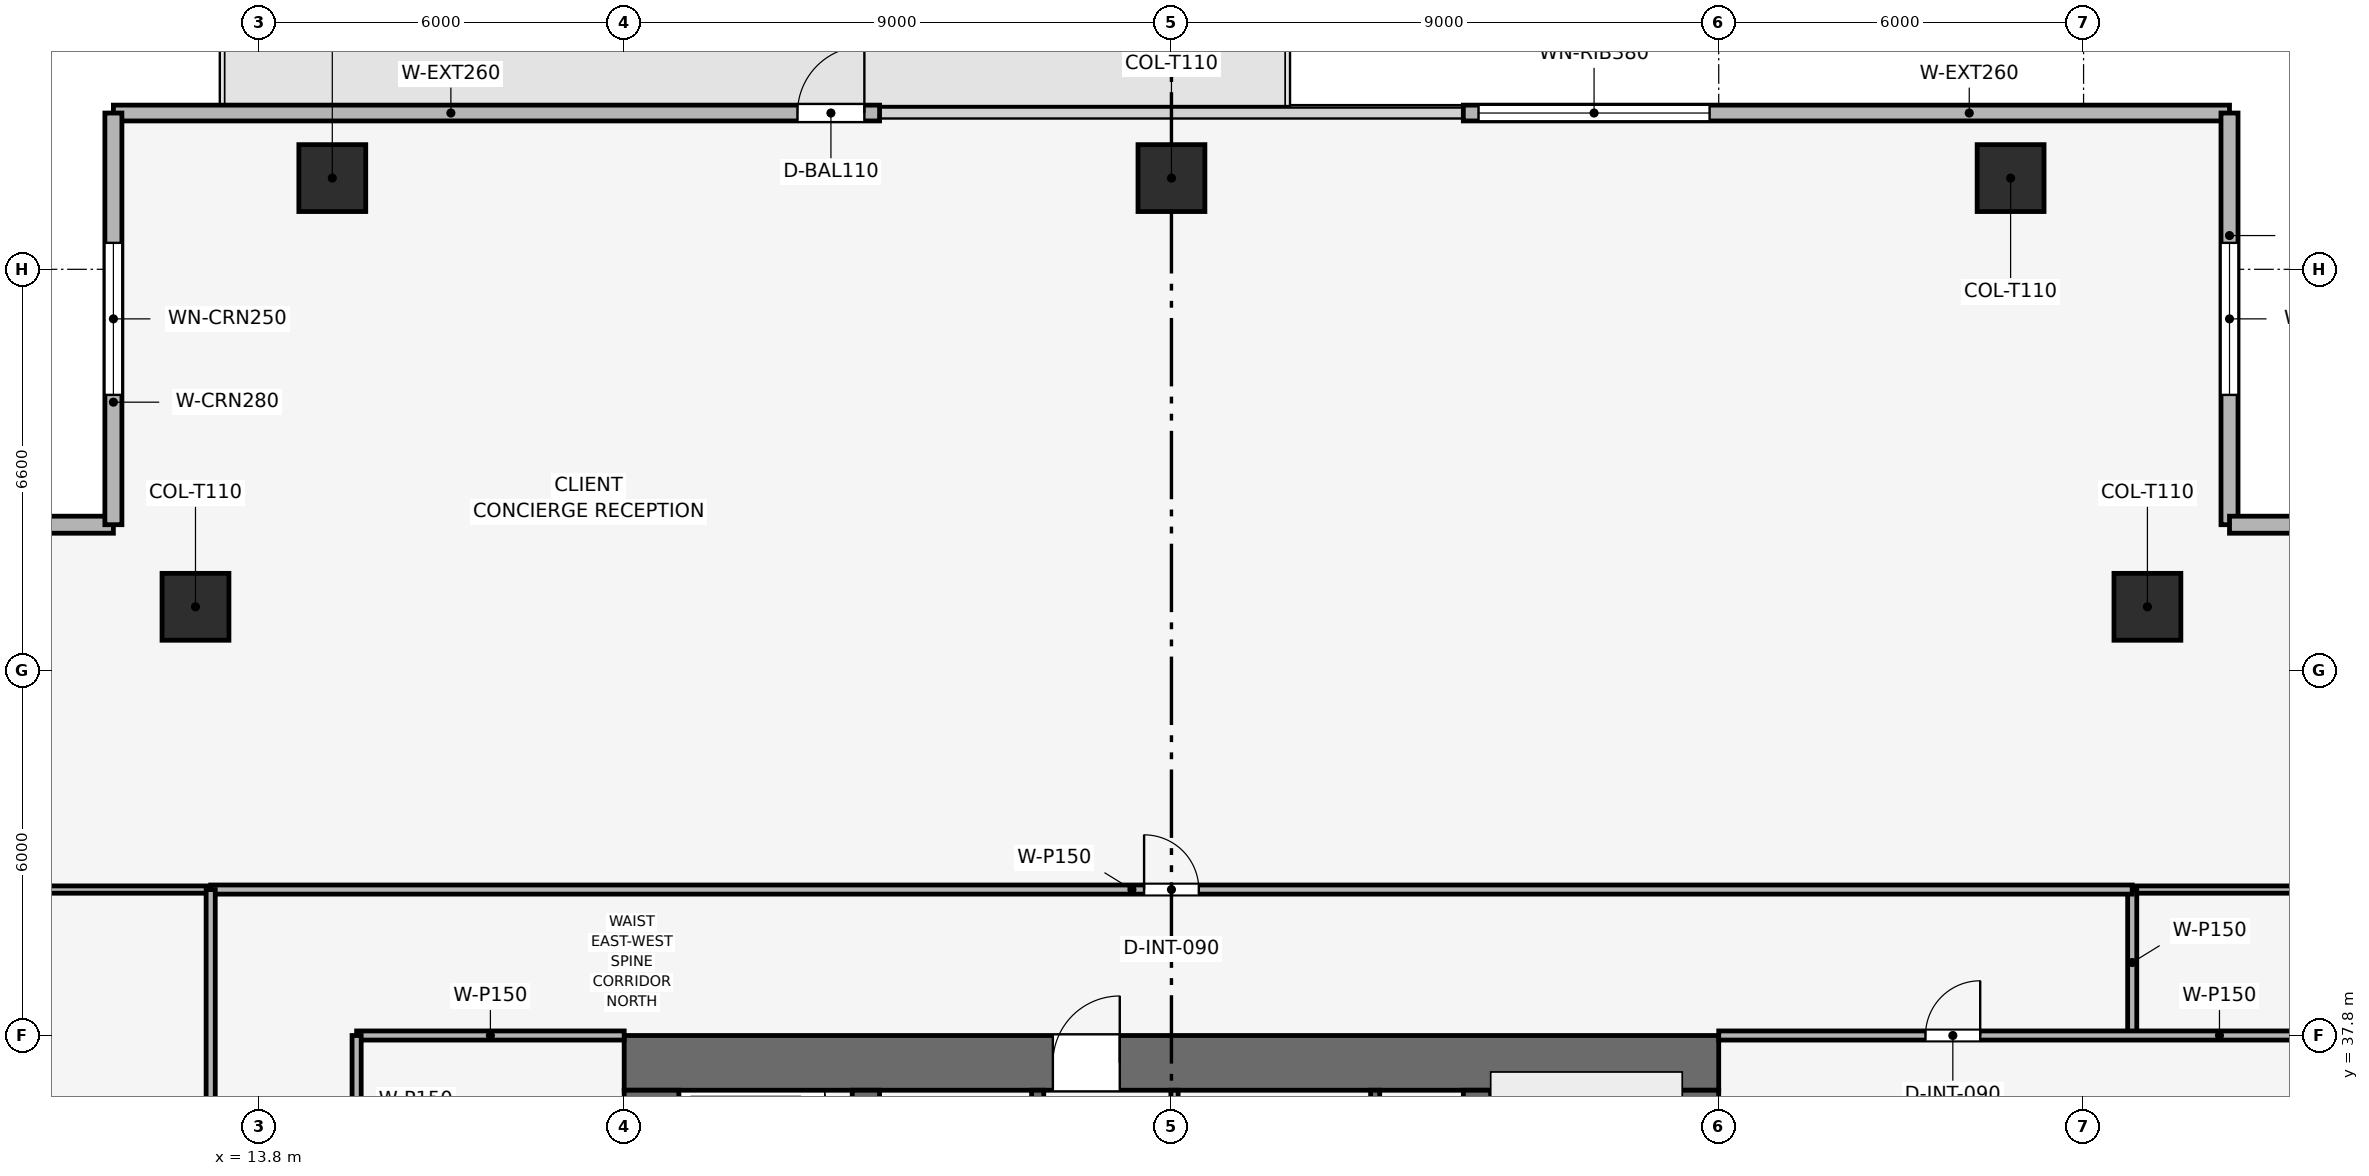
"""IFC4 building model, lengths in metres.
Left out: names, types, materials, properties, quantities, classifications, styles, units other than length and angle.
Written with IfcOpenShell. Run it as: python <this file> out.ifc"""

import sys

from ifc_helpers import new_model, si_unit, direction, frame, frame_2d, origin, origin_2d, place, context, subcontext, project, spatial, rectangle, extrude, element, fill, save


model = new_model("IFC4")
c1 = context("Model", 3, precision=1e-05, world=origin(), true_north=direction((0.0, 1.0)))
c2 = subcontext(c1, "Body", "Model", "MODEL_VIEW")
j1 = project(units=[si_unit("LENGTHUNIT", "METRE"), si_unit("PLANEANGLEUNIT", "RADIAN")], contexts=[c1])
p1 = place(None, origin())
s1 = spatial("IfcSite", under=j1, at=p1, CompositionType="ELEMENT")
p2 = place(p1, origin())
s2 = spatial("IfcBuilding", under=s1, at=p2, CompositionType="ELEMENT")
p3 = place(p2, frame((0.0, 0.0, 142.05)))
s3 = spatial("IfcBuildingStorey", under=s2, at=p3, CompositionType="ELEMENT", Elevation=142.05)
p4 = place(p3, frame((19.8, 37.35, 0.0), z_axis=(0.0, 0.0, 1.0), x_axis=(1.0, 0.0, 0.0)))
e1 = element("IfcWall", 1, at=p4, inside=s3, PredefinedType="SHEAR", context=c2, shape_type="SweptSolid", body=[
    extrude(rectangle(XDim=18.0, YDim=0.9, at=frame_2d((9.0, 0.0))), origin(), (0.0, 0.0, 1.0), 3.75),
])
p5 = place(p4, frame((7.05, 0.0, 0.0)))
e2 = element("IfcOpeningElement", 2, at=p5, cuts=e1, PredefinedType="OPENING", context=c2, shape_type="SweptSolid", body=[
    extrude(rectangle(XDim=1.1, YDim=2.15, at=frame_2d((0.55, 1.075))), frame((0.0, 0.46, 0.0), z_axis=(0.0, -1.0, 0.0), x_axis=(1.0, 0.0, 0.0)), (0.0, 0.0, 1.0), 0.92),
])
p6 = place(p3, frame((20.25, 20.7, 0.0), z_axis=(0.0, 0.0, 1.0), x_axis=(0.0, 1.0, 0.0)))
e3 = element("IfcWall", 3, at=p6, inside=s3, PredefinedType="SHEAR", context=c2, shape_type="SweptSolid", body=[
    extrude(rectangle(XDim=16.2, YDim=0.9, at=frame_2d((8.1, 0.0))), origin(), (0.0, 0.0, 1.0), 3.75),
])
p7 = place(p6, frame((10.1, 0.0, 0.0)))
e4 = element("IfcOpeningElement", 4, at=p7, cuts=e3, PredefinedType="OPENING", context=c2, shape_type="SweptSolid", body=[
    extrude(rectangle(XDim=1.1, YDim=2.15, at=frame_2d((0.55, 1.075))), frame((0.0, 0.46, 0.0), z_axis=(0.0, -1.0, 0.0), x_axis=(1.0, 0.0, 0.0)), (0.0, 0.0, 1.0), 0.92),
])
p8 = place(p3, frame((37.35, 20.7, 0.0), z_axis=(0.0, 0.0, 1.0), x_axis=(0.0, 1.0, 0.0)))
e5 = element("IfcWall", 5, at=p8, inside=s3, PredefinedType="SHEAR", context=c2, shape_type="SweptSolid", body=[
    extrude(rectangle(XDim=16.2, YDim=0.9, at=frame_2d((8.1, 0.0))), origin(), (0.0, 0.0, 1.0), 3.75),
])
p9 = place(p8, frame((4.6, 0.0, 0.0)))
e6 = element("IfcOpeningElement", 6, at=p9, cuts=e5, PredefinedType="OPENING", context=c2, shape_type="SweptSolid", body=[
    extrude(rectangle(XDim=1.1, YDim=2.15, at=frame_2d((0.55, 1.075))), frame((0.0, 0.46, 0.0), z_axis=(0.0, -1.0, 0.0), x_axis=(1.0, 0.0, 0.0)), (0.0, 0.0, 1.0), 0.92),
])
for number, where, z_axis, x_axis in (
    (7, (23.775, 20.7, 0.0), (0.0, 0.0, 1.0), (0.0, 1.0, 0.0)),
    (8, (33.825, 20.7, 0.0), (0.0, 0.0, 1.0), (0.0, 1.0, 0.0)),
):
    element("IfcWall", number, at=place(p3, frame(where, z_axis=z_axis, x_axis=x_axis)), inside=s3, PredefinedType="SHEAR", context=c2, shape_type="SweptSolid", body=[
        extrude(rectangle(XDim=16.2, YDim=0.45, at=frame_2d((8.1, 0.0))), origin(), (0.0, 0.0, 1.0), 3.75),
    ])
for number, where, z_axis, x_axis in (
    (9, (42.6, 51.9, 0.003), (0.0, 0.0, 1.0), (1.0, 0.0, 0.0)),
    (10, (28.8, 51.9, 0.003), (0.0, 0.0, 1.0), (1.0, 0.0, 0.0)),
    (11, (15.0, 51.9, 0.003), (0.0, 0.0, 1.0), (1.0, 0.0, 0.0)),
    (12, (44.85, 44.85, 0.003), (0.0, 0.0, 1.0), (1.0, 0.0, 0.0)),
    (13, (12.75, 44.85, 0.003), (0.0, 0.0, 1.0), (1.0, 0.0, 0.0)),
):
    element("IfcColumn", number, at=place(p3, frame(where, z_axis=z_axis, x_axis=x_axis)), inside=s3, PredefinedType="COLUMN", context=c2, shape_type="SweptSolid", body=[
        extrude(rectangle(XDim=1.1, YDim=1.1, at=origin_2d()), origin(), (0.0, 0.0, 1.0), 3.489),
    ])
p10 = place(p3, frame((11.4, 52.97, 0.0), z_axis=(0.0, 0.0, 1.0), x_axis=(1.0, 0.0, 0.0)))
e14 = element("IfcWall", 14, at=p10, inside=s3, PredefinedType="SOLIDWALL", context=c2, shape_type="SweptSolid", body=[
    extrude(rectangle(XDim=12.6, YDim=0.26, at=frame_2d((6.3, 0.0))), origin(), (0.0, 0.0, 1.0), 3.495),
])
p11 = place(p10, frame((11.25, 0.0, 0.0)))
e15 = element("IfcOpeningElement", 15, at=p11, cuts=e14, PredefinedType="OPENING", context=c2, shape_type="SweptSolid", body=[
    extrude(rectangle(XDim=1.1, YDim=2.2, at=frame_2d((0.55, 1.1))), frame((0.0, 0.14, 0.0), z_axis=(0.0, -1.0, 0.0), x_axis=(1.0, 0.0, 0.0)), (0.0, 0.0, 1.0), 0.28),
])
p12 = place(p3, frame((33.6, 52.97, 0.0), z_axis=(0.0, 0.0, 1.0), x_axis=(1.0, 0.0, 0.0)))
e16 = element("IfcWall", 16, at=p12, inside=s3, PredefinedType="SOLIDWALL", context=c2, shape_type="SweptSolid", body=[
    extrude(rectangle(XDim=12.6, YDim=0.26, at=frame_2d((6.3, 0.0))), origin(), (0.0, 0.0, 1.0), 3.495),
])
p13 = place(p12, frame((0.25, 0.0, 0.9)))
e17 = element("IfcOpeningElement", 17, at=p13, cuts=e16, PredefinedType="OPENING", context=c2, shape_type="SweptSolid", body=[
    extrude(rectangle(XDim=3.8, YDim=1.9, at=frame_2d((1.9, 0.95))), frame((0.0, 0.14, 0.0), z_axis=(0.0, -1.0, 0.0), x_axis=(1.0, 0.0, 0.0)), (0.0, 0.0, 1.0), 0.28),
])
p14 = place(p3, frame((4.63, 46.2, 0.0), z_axis=(0.0, 0.0, 1.0), x_axis=(1.0, 0.0, 0.0)))
e18 = element("IfcWall", 18, at=p14, inside=s3, PredefinedType="SOLIDWALL", context=c2, shape_type="SweptSolid", body=[
    extrude(rectangle(XDim=6.77, YDim=0.28, at=frame_2d((3.385, 0.0))), origin(), (0.0, 0.0, 1.0), 3.495),
])
p15 = place(p14, frame((2.135, 0.0, 0.9)))
e19 = element("IfcOpeningElement", 19, at=p15, cuts=e18, PredefinedType="OPENING", context=c2, shape_type="SweptSolid", body=[
    extrude(rectangle(XDim=2.5, YDim=1.9, at=frame_2d((1.25, 0.95))), frame((0.0, 0.15, 0.0), z_axis=(0.0, -1.0, 0.0), x_axis=(1.0, 0.0, 0.0)), (0.0, 0.0, 1.0), 0.3),
])
p16 = place(p3, frame((11.4, 46.2, 0.0), z_axis=(0.0, 0.0, 1.0), x_axis=(0.0, 1.0, 0.0)))
e20 = element("IfcWall", 20, at=p16, inside=s3, PredefinedType="SOLIDWALL", context=c2, shape_type="SweptSolid", body=[
    extrude(rectangle(XDim=6.77, YDim=0.28, at=frame_2d((3.385, 0.0))), origin(), (0.0, 0.0, 1.0), 3.495),
])
p17 = place(p16, frame((2.135, 0.0, 0.9)))
e21 = element("IfcOpeningElement", 21, at=p17, cuts=e20, PredefinedType="OPENING", context=c2, shape_type="SweptSolid", body=[
    extrude(rectangle(XDim=2.5, YDim=1.9, at=frame_2d((1.25, 0.95))), frame((0.0, 0.15, 0.0), z_axis=(0.0, -1.0, 0.0), x_axis=(1.0, 0.0, 0.0)), (0.0, 0.0, 1.0), 0.3),
])
p18 = place(p3, frame((46.2, 52.97, 0.0), z_axis=(0.0, 0.0, 1.0), x_axis=(0.0, -1.0, 0.0)))
e22 = element("IfcWall", 22, at=p18, inside=s3, PredefinedType="SOLIDWALL", context=c2, shape_type="SweptSolid", body=[
    extrude(rectangle(XDim=6.77, YDim=0.28, at=frame_2d((3.385, 0.0))), origin(), (0.0, 0.0, 1.0), 3.495),
])
p19 = place(p18, frame((2.135, 0.0, 0.9)))
e23 = element("IfcOpeningElement", 23, at=p19, cuts=e22, PredefinedType="OPENING", context=c2, shape_type="SweptSolid", body=[
    extrude(rectangle(XDim=2.5, YDim=1.9, at=frame_2d((1.25, 0.95))), frame((0.0, 0.15, 0.0), z_axis=(0.0, -1.0, 0.0), x_axis=(1.0, 0.0, 0.0)), (0.0, 0.0, 1.0), 0.3),
])
p20 = place(p3, frame((46.2, 46.2, 0.0), z_axis=(0.0, 0.0, 1.0), x_axis=(1.0, 0.0, 0.0)))
e24 = element("IfcWall", 24, at=p20, inside=s3, PredefinedType="SOLIDWALL", context=c2, shape_type="SweptSolid", body=[
    extrude(rectangle(XDim=6.77, YDim=0.28, at=frame_2d((3.385, 0.0))), origin(), (0.0, 0.0, 1.0), 3.495),
])
p21 = place(p20, frame((2.135, 0.0, 0.9)))
e25 = element("IfcOpeningElement", 25, at=p21, cuts=e24, PredefinedType="OPENING", context=c2, shape_type="SweptSolid", body=[
    extrude(rectangle(XDim=2.5, YDim=1.9, at=frame_2d((1.25, 0.95))), frame((0.0, 0.15, 0.0), z_axis=(0.0, -1.0, 0.0), x_axis=(1.0, 0.0, 0.0)), (0.0, 0.0, 1.0), 0.3),
])
p22 = place(p3, frame((32.15, 34.0, 0.0), z_axis=(0.0, 0.0, 1.0), x_axis=(0.0, 1.0, 0.0)))
e26 = element("IfcWall", 26, at=p22, inside=s3, PredefinedType="SHEAR", context=c2, shape_type="SweptSolid", body=[
    extrude(rectangle(XDim=2.9, YDim=0.15, at=frame_2d((1.45, 0.0))), origin(), (0.0, 0.0, 1.0), 3.495),
])
p23 = place(p3, frame((26.6, 34.0, 0.0), z_axis=(0.0, 0.0, 1.0), x_axis=(0.0, 1.0, 0.0)))
e27 = element("IfcWall", 27, at=p23, inside=s3, PredefinedType="SHEAR", context=c2, shape_type="SweptSolid", body=[
    extrude(rectangle(XDim=2.9, YDim=0.2, at=frame_2d((1.45, 0.0))), origin(), (0.0, 0.0, 1.0), 3.495),
])
p24 = place(p23, frame((0.75, 0.0, 0.0)))
e28 = element("IfcOpeningElement", 28, at=p24, cuts=e27, PredefinedType="OPENING", context=c2, shape_type="SweptSolid", body=[
    extrude(rectangle(XDim=1.1, YDim=2.15, at=frame_2d((0.55, 1.075))), frame((0.0, 0.11, 0.0), z_axis=(0.0, -1.0, 0.0), x_axis=(1.0, 0.0, 0.0)), (0.0, 0.0, 1.0), 0.22),
])
p25 = place(p3, frame((28.85, 33.925, 0.0), z_axis=(0.0, 0.0, 1.0), x_axis=(0.0, 1.0, 0.0)))
e29 = element("IfcWall", 29, at=p25, inside=s3, PredefinedType="PARTITIONING", context=c2, shape_type="SweptSolid", body=[
    extrude(rectangle(XDim=2.975, YDim=0.12, at=frame_2d((1.487, 0.0))), origin(), (0.0, 0.0, 1.0), 3.495),
])
p26 = place(p25, frame((0.25, 0.0, 0.0)))
e30 = element("IfcOpeningElement", 30, at=p26, cuts=e29, PredefinedType="OPENING", context=c2, shape_type="SweptSolid", body=[
    extrude(rectangle(XDim=0.85, YDim=2.1, at=frame_2d((0.425, 1.05))), frame((0.0, 0.07, 0.0), z_axis=(0.0, -1.0, 0.0), x_axis=(1.0, 0.0, 0.0)), (0.0, 0.0, 1.0), 0.14),
])
p27 = place(p25, frame((1.645, 0.0, 0.0)))
e31 = element("IfcOpeningElement", 31, at=p27, cuts=e29, PredefinedType="OPENING", context=c2, shape_type="SweptSolid", body=[
    extrude(rectangle(XDim=0.85, YDim=2.1, at=frame_2d((0.425, 1.05))), frame((0.0, 0.07, 0.0), z_axis=(0.0, -1.0, 0.0), x_axis=(1.0, 0.0, 0.0)), (0.0, 0.0, 1.0), 0.14),
])
p28 = place(p3, frame((15.4, 37.8, 0.0), z_axis=(0.0, 0.0, 1.0), x_axis=(1.0, 0.0, 0.0)))
e32 = element("IfcWall", 32, at=p28, inside=s3, PredefinedType="PARTITIONING", context=c2, shape_type="SweptSolid", body=[
    extrude(rectangle(XDim=4.4, YDim=0.15, at=frame_2d((2.2, 0.0))), origin(), (0.0, 0.0, 1.0), 3.03),
])
p29 = place(p3, frame((15.4, 32.45, 0.0), z_axis=(0.0, 0.0, 1.0), x_axis=(0.0, 1.0, 0.0)))
e33 = element("IfcWall", 33, at=p29, inside=s3, PredefinedType="PARTITIONING", context=c2, shape_type="SweptSolid", body=[
    extrude(rectangle(XDim=5.35, YDim=0.15, at=frame_2d((2.675, 0.0))), origin(), (0.0, 0.0, 1.0), 3.03),
])
p30 = place(p29, frame((2.1, 0.0, 0.0)))
e34 = element("IfcOpeningElement", 34, at=p30, cuts=e33, PredefinedType="OPENING", context=c2, shape_type="SweptSolid", body=[
    extrude(rectangle(XDim=0.9, YDim=2.1, at=frame_2d((0.45, 1.05))), frame((0.0, 0.085, 0.0), z_axis=(0.0, -1.0, 0.0), x_axis=(1.0, 0.0, 0.0)), (0.0, 0.0, 1.0), 0.17),
])
p31 = place(p3, frame((4.63, 40.2, 0.0), z_axis=(0.0, 0.0, 1.0), x_axis=(1.0, 0.0, 0.0)))
e35 = element("IfcWall", 35, at=p31, inside=s3, PredefinedType="PARTITIONING", context=c2, shape_type="SweptSolid", body=[
    extrude(rectangle(XDim=8.37, YDim=0.12, at=frame_2d((4.185, 0.0))), origin(), (0.0, 0.0, 1.0), 2.98),
])
p32 = place(p3, frame((44.6, 40.2, 0.0), z_axis=(0.0, 0.0, 1.0), x_axis=(1.0, 0.0, 0.0)))
e36 = element("IfcWall", 36, at=p32, inside=s3, PredefinedType="PARTITIONING", context=c2, shape_type="SweptSolid", body=[
    extrude(rectangle(XDim=8.37, YDim=0.12, at=frame_2d((4.185, 0.0))), origin(), (0.0, 0.0, 1.0), 2.98),
])
p33 = place(p3, frame((44.6, 37.8, 0.0), z_axis=(0.0, 0.0, 1.0), x_axis=(0.0, 1.0, 0.0)))
e37 = element("IfcWall", 37, at=p33, inside=s3, PredefinedType="PARTITIONING", context=c2, shape_type="SweptSolid", body=[
    extrude(rectangle(XDim=2.4, YDim=0.15, at=frame_2d((1.2, 0.0))), origin(), (0.0, 0.0, 1.0), 3.495),
])
p34 = place(p3, frame((37.8, 37.8, 0.0), z_axis=(0.0, 0.0, 1.0), x_axis=(1.0, 0.0, 0.0)))
e38 = element("IfcWall", 38, at=p34, inside=s3, PredefinedType="PARTITIONING", context=c2, shape_type="SweptSolid", body=[
    extrude(rectangle(XDim=15.17, YDim=0.15, at=frame_2d((7.585, 0.0))), origin(), (0.0, 0.0, 1.0), 2.98),
])
p35 = place(p34, frame((3.4, 0.0, 0.0)))
e39 = element("IfcOpeningElement", 39, at=p35, cuts=e38, PredefinedType="OPENING", context=c2, shape_type="SweptSolid", body=[
    extrude(rectangle(XDim=0.9, YDim=2.1, at=frame_2d((0.45, 1.05))), frame((0.0, 0.085, 0.0), z_axis=(0.0, -1.0, 0.0), x_axis=(1.0, 0.0, 0.0)), (0.0, 0.0, 1.0), 0.17),
])
p36 = place(p3, frame((13.0, 40.2, 0.0), z_axis=(0.0, 0.0, 1.0), x_axis=(1.0, 0.0, 0.0)))
e40 = element("IfcWall", 40, at=p36, inside=s3, PredefinedType="PARTITIONING", context=c2, shape_type="SweptSolid", body=[
    extrude(rectangle(XDim=31.6, YDim=0.15, at=frame_2d((15.8, 0.0))), origin(), (0.0, 0.0, 1.0), 3.03),
])
p37 = place(p36, frame((15.35, 0.0, 0.0)))
e41 = element("IfcOpeningElement", 41, at=p37, cuts=e40, PredefinedType="OPENING", context=c2, shape_type="SweptSolid", body=[
    extrude(rectangle(XDim=0.9, YDim=2.1, at=frame_2d((0.45, 1.05))), frame((0.0, 0.085, 0.0), z_axis=(0.0, -1.0, 0.0), x_axis=(1.0, 0.0, 0.0)), (0.0, 0.0, 1.0), 0.17),
])
p38 = place(p3, frame((13.0, 17.4, 0.0), z_axis=(0.0, 0.0, 1.0), x_axis=(0.0, 1.0, 0.0)))
e42 = element("IfcWall", 42, at=p38, inside=s3, PredefinedType="PARTITIONING", context=c2, shape_type="SweptSolid", body=[
    extrude(rectangle(XDim=22.8, YDim=0.15, at=frame_2d((11.4, 0.0))), origin(), (0.0, 0.0, 1.0), 3.03),
])
p39 = place(p38, frame((3.113, 0.0, 0.0)))
e43 = element("IfcOpeningElement", 43, at=p39, cuts=e42, PredefinedType="OPENING", context=c2, shape_type="SweptSolid", body=[
    extrude(rectangle(XDim=0.9, YDim=2.1, at=frame_2d((0.45, 1.05))), frame((0.0, 0.085, 0.0), z_axis=(0.0, -1.0, 0.0), x_axis=(1.0, 0.0, 0.0)), (0.0, 0.0, 1.0), 0.17),
])
p40 = place(p38, frame((7.542, 0.0, 0.0)))
e44 = element("IfcOpeningElement", 44, at=p40, cuts=e42, PredefinedType="OPENING", context=c2, shape_type="SweptSolid", body=[
    extrude(rectangle(XDim=0.9, YDim=2.1, at=frame_2d((0.45, 1.05))), frame((0.0, 0.085, 0.0), z_axis=(0.0, -1.0, 0.0), x_axis=(1.0, 0.0, 0.0)), (0.0, 0.0, 1.0), 0.17),
])
p41 = place(p38, frame((15.378, 0.0, 0.0)))
e45 = element("IfcOpeningElement", 45, at=p41, cuts=e42, PredefinedType="OPENING", context=c2, shape_type="SweptSolid", body=[
    extrude(rectangle(XDim=0.9, YDim=2.1, at=frame_2d((0.45, 1.05))), frame((0.0, 0.085, 0.0), z_axis=(0.0, -1.0, 0.0), x_axis=(1.0, 0.0, 0.0)), (0.0, 0.0, 1.0), 0.17),
])
p42 = place(p11, origin())
e46 = element("IfcDoor", 46, at=p42, inside=s3, OperationType="SINGLE_SWING_RIGHT", PredefinedType="DOOR", context=c2, shape_type="SweptSolid", body=[
    extrude(rectangle(XDim=1.1, YDim=2.2, at=frame_2d((0.55, 1.1))), frame((0.0, 0.025, 0.0), z_axis=(0.0, -1.0, 0.0), x_axis=(1.0, 0.0, 0.0)), (0.0, 0.0, 1.0), 0.05),
])
fill(e15, e46)
p43 = place(p13, origin())
e47 = element("IfcWindow", 47, at=p43, inside=s3, PartitioningType="SINGLE_PANEL", PredefinedType="WINDOW", context=c2, shape_type="SweptSolid", body=[
    extrude(rectangle(XDim=3.8, YDim=1.9, at=frame_2d((1.9, 0.95))), frame((0.0, 0.03, 0.0), z_axis=(0.0, -1.0, 0.0), x_axis=(1.0, 0.0, 0.0)), (0.0, 0.0, 1.0), 0.06),
])
fill(e17, e47)
p44 = place(p17, origin())
e48 = element("IfcWindow", 48, at=p44, inside=s3, PartitioningType="SINGLE_PANEL", PredefinedType="WINDOW", context=c2, shape_type="SweptSolid", body=[
    extrude(rectangle(XDim=2.5, YDim=1.9, at=frame_2d((1.25, 0.95))), frame((0.0, 0.03, 0.0), z_axis=(0.0, -1.0, 0.0), x_axis=(1.0, 0.0, 0.0)), (0.0, 0.0, 1.0), 0.06),
])
fill(e21, e48)
p45 = place(p19, origin())
e49 = element("IfcWindow", 49, at=p45, inside=s3, PartitioningType="SINGLE_PANEL", PredefinedType="WINDOW", context=c2, shape_type="SweptSolid", body=[
    extrude(rectangle(XDim=2.5, YDim=1.9, at=frame_2d((1.25, 0.95))), frame((0.0, 0.03, 0.0), z_axis=(0.0, -1.0, 0.0), x_axis=(1.0, 0.0, 0.0)), (0.0, 0.0, 1.0), 0.06),
])
fill(e23, e49)
p46 = place(p35, origin())
e50 = element("IfcDoor", 50, at=p46, inside=s3, OperationType="SINGLE_SWING_RIGHT", PredefinedType="DOOR", context=c2, shape_type="SweptSolid", body=[
    extrude(rectangle(XDim=0.9, YDim=2.1, at=frame_2d((0.45, 1.05))), frame((0.0, 0.025, 0.0), z_axis=(0.0, -1.0, 0.0), x_axis=(1.0, 0.0, 0.0)), (0.0, 0.0, 1.0), 0.05),
])
fill(e39, e50)
p47 = place(p37, origin())
e51 = element("IfcDoor", 51, at=p47, inside=s3, OperationType="SINGLE_SWING_LEFT", PredefinedType="DOOR", context=c2, shape_type="SweptSolid", body=[
    extrude(rectangle(XDim=0.9, YDim=2.1, at=frame_2d((0.45, 1.05))), frame((0.0, 0.025, 0.0), z_axis=(0.0, -1.0, 0.0), x_axis=(1.0, 0.0, 0.0)), (0.0, 0.0, 1.0), 0.05),
])
fill(e41, e51)
p48 = place(p5, origin())
e52 = element("IfcDoor", 52, at=p48, inside=s3, OperationType="SINGLE_SWING_RIGHT", PredefinedType="DOOR", context=c2, shape_type="SweptSolid", body=[
    extrude(rectangle(XDim=1.1, YDim=2.15, at=frame_2d((0.55, 1.075))), frame((0.0, 0.025, 0.0), z_axis=(0.0, -1.0, 0.0), x_axis=(1.0, 0.0, 0.0)), (0.0, 0.0, 1.0), 0.05),
])
fill(e2, e52)
save(model, sys.argv[1])
